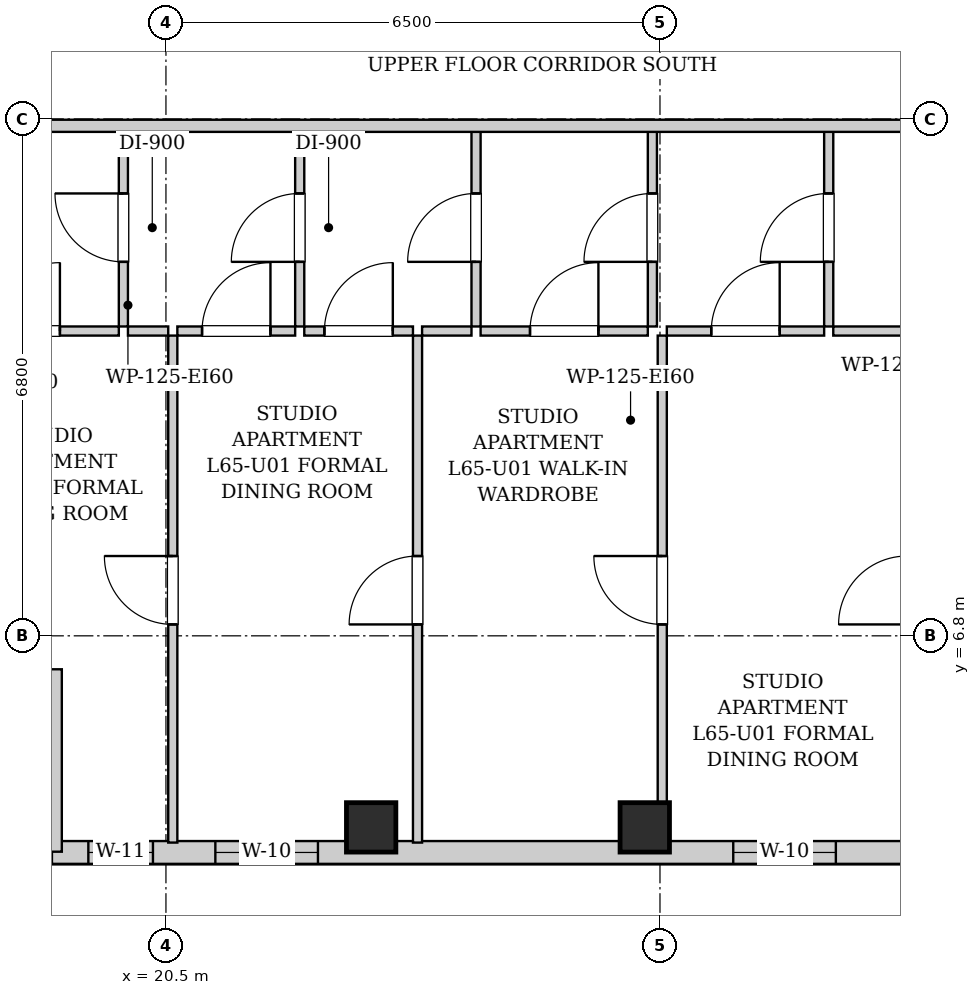
"""IFC4 building model, lengths in metres.
Left out: names, types, materials, properties, quantities, classifications, styles, units other than length and angle.
Written with IfcOpenShell. Run it as: python <this file> out.ifc"""

import sys

from ifc_helpers import new_model, si_unit, direction, frame, frame_2d, origin, origin_2d, place, context, subcontext, project, spatial, rectangle, extrude, element, fill, save


model = new_model("IFC4")
c1 = context("Model", 3, precision=1e-05, world=origin(), true_north=direction((0.0, 1.0)))
c2 = subcontext(c1, "Body", "Model", "MODEL_VIEW")
j1 = project(units=[si_unit("LENGTHUNIT", "METRE"), si_unit("PLANEANGLEUNIT", "RADIAN")], contexts=[c1])
p1 = place(None, origin())
s1 = spatial("IfcSite", under=j1, at=p1, CompositionType="ELEMENT")
p2 = place(p1, origin())
s2 = spatial("IfcBuilding", under=s1, at=p2, CompositionType="ELEMENT")
p3 = place(p2, frame((0.0, 0.0, 224.1)))
s3 = spatial("IfcBuildingStorey", under=s2, at=p3, CompositionType="ELEMENT", Elevation=224.1)
for number, where, z_axis, x_axis in (
    (1, (23.2, 4.28, 0.0), (0.0, 0.0, 1.0), (1.0, 0.0, 0.0)),
    (2, (26.8, 4.28, 0.0), (0.0, 0.0, 1.0), (1.0, 0.0, 0.0)),
):
    element("IfcColumn", number, at=place(p3, frame(where, z_axis=z_axis, x_axis=x_axis)), inside=s3, PredefinedType="COLUMN", context=c2, shape_type="SweptSolid", body=[
        extrude(rectangle(XDim=0.65, YDim=0.65, at=origin_2d()), origin(), (0.0, 0.0, 1.0), 3.4),
    ])
p4 = place(p3, frame((31.5, 3.95, 0.0), z_axis=(0.0, 0.0, 1.0), x_axis=(-1.0, 0.0, 0.0)))
e3 = element("IfcWall", 3, at=p4, inside=s3, PredefinedType="SOLIDWALL", context=c2, shape_type="SweptSolid", body=[
    extrude(rectangle(XDim=12.5, YDim=0.3, at=frame_2d((6.25, 0.0))), origin(), (0.0, 0.0, 1.0), 3.14),
])
p5 = place(p4, frame((11.171, 0.0, 0.55)))
e4 = element("IfcOpeningElement", 4, at=p5, cuts=e3, PredefinedType="OPENING", context=c2, shape_type="SweptSolid", body=[
    extrude(rectangle(XDim=0.85, YDim=1.2, at=frame_2d((0.425, 0.6))), frame((0.0, 0.16, 0.0), z_axis=(0.0, -1.0, 0.0), x_axis=(1.0, 0.0, 0.0)), (0.0, 0.0, 1.0), 0.32),
])
p6 = place(p4, frame((9.0, 0.0, 0.55)))
e5 = element("IfcOpeningElement", 5, at=p6, cuts=e3, PredefinedType="OPENING", context=c2, shape_type="SweptSolid", body=[
    extrude(rectangle(XDim=1.35, YDim=1.2, at=frame_2d((0.675, 0.6))), frame((0.0, 0.16, 0.0), z_axis=(0.0, -1.0, 0.0), x_axis=(1.0, 0.0, 0.0)), (0.0, 0.0, 1.0), 0.32),
])
p7 = place(p4, frame((2.186, 0.0, 0.55)))
e6 = element("IfcOpeningElement", 6, at=p7, cuts=e3, PredefinedType="OPENING", context=c2, shape_type="SweptSolid", body=[
    extrude(rectangle(XDim=1.35, YDim=1.2, at=frame_2d((0.675, 0.6))), frame((0.0, 0.16, 0.0), z_axis=(0.0, -1.0, 0.0), x_axis=(1.0, 0.0, 0.0)), (0.0, 0.0, 1.0), 0.32),
])
p8 = place(p4, frame((0.35, 0.0, 0.55)))
e7 = element("IfcOpeningElement", 7, at=p8, cuts=e3, PredefinedType="OPENING", context=c2, shape_type="SweptSolid", body=[
    extrude(rectangle(XDim=0.68, YDim=1.2, at=frame_2d((0.34, 0.6))), frame((0.0, 0.16, 0.0), z_axis=(0.0, -1.0, 0.0), x_axis=(1.0, 0.0, 0.0)), (0.0, 0.0, 1.0), 0.32),
])
p9 = place(p3, frame((19.0, 3.96, 0.0), z_axis=(0.0, 0.0, 1.0), x_axis=(0.0, 1.0, 0.0)))
e8 = element("IfcWall", 8, at=p9, inside=s3, PredefinedType="SOLIDWALL", context=c2, shape_type="SweptSolid", body=[
    extrude(rectangle(XDim=2.4, YDim=0.26, at=frame_2d((1.2, 0.0))), origin(), (0.0, 0.0, 1.0), 3.14),
])
p10 = place(p3, frame((19.94, 10.87, 0.0), z_axis=(0.0, 0.0, 1.0), x_axis=(0.0, 1.0, 0.0)))
e9 = element("IfcWall", 9, at=p10, inside=s3, PredefinedType="PARTITIONING", context=c2, shape_type="SweptSolid", body=[
    extrude(rectangle(XDim=2.6, YDim=0.12, at=frame_2d((1.3, 0.0))), origin(), (0.0, 0.0, 1.0), 3.14),
])
p11 = place(p10, frame((0.85, 0.0, 0.0)))
e10 = element("IfcOpeningElement", 10, at=p11, cuts=e9, PredefinedType="OPENING", context=c2, shape_type="SweptSolid", body=[
    extrude(rectangle(XDim=0.9, YDim=2.05, at=frame_2d((0.45, 1.025))), frame((0.0, 0.07, 0.0), z_axis=(0.0, -1.0, 0.0), x_axis=(1.0, 0.0, 0.0)), (0.0, 0.0, 1.0), 0.14),
])
p12 = place(p3, frame((17.43, 10.81, 0.0), z_axis=(0.0, 0.0, 1.0), x_axis=(1.0, 0.0, 0.0)))
e11 = element("IfcWall", 11, at=p12, inside=s3, PredefinedType="PARTITIONING", context=c2, shape_type="SweptSolid", body=[
    extrude(rectangle(XDim=2.45, YDim=0.12, at=frame_2d((1.225, 0.0))), origin(), (0.0, 0.0, 1.0), 3.14),
])
p13 = place(p12, frame((0.775, 0.0, 0.0)))
e12 = element("IfcOpeningElement", 12, at=p13, cuts=e11, PredefinedType="OPENING", context=c2, shape_type="SweptSolid", body=[
    extrude(rectangle(XDim=0.9, YDim=2.05, at=frame_2d((0.45, 1.025))), frame((0.0, 0.07, 0.0), z_axis=(0.0, -1.0, 0.0), x_axis=(1.0, 0.0, 0.0)), (0.0, 0.0, 1.0), 0.14),
])
p14 = place(p3, frame((22.26, 10.87, 0.0), z_axis=(0.0, 0.0, 1.0), x_axis=(0.0, 1.0, 0.0)))
e13 = element("IfcWall", 13, at=p14, inside=s3, PredefinedType="PARTITIONING", context=c2, shape_type="SweptSolid", body=[
    extrude(rectangle(XDim=2.6, YDim=0.12, at=frame_2d((1.3, 0.0))), origin(), (0.0, 0.0, 1.0), 3.14),
])
p15 = place(p14, frame((0.85, 0.0, 0.0)))
e14 = element("IfcOpeningElement", 14, at=p15, cuts=e13, PredefinedType="OPENING", context=c2, shape_type="SweptSolid", body=[
    extrude(rectangle(XDim=0.9, YDim=2.05, at=frame_2d((0.45, 1.025))), frame((0.0, 0.07, 0.0), z_axis=(0.0, -1.0, 0.0), x_axis=(1.0, 0.0, 0.0)), (0.0, 0.0, 1.0), 0.14),
])
p16 = place(p3, frame((20.0, 10.81, 0.0), z_axis=(0.0, 0.0, 1.0), x_axis=(1.0, 0.0, 0.0)))
e15 = element("IfcWall", 15, at=p16, inside=s3, PredefinedType="PARTITIONING", context=c2, shape_type="SweptSolid", body=[
    extrude(rectangle(XDim=0.53, YDim=0.12, at=frame_2d((0.265, 0.0))), origin(), (0.0, 0.0, 1.0), 3.14),
])
p17 = place(p3, frame((20.65, 10.81, 0.0), z_axis=(0.0, 0.0, 1.0), x_axis=(1.0, 0.0, 0.0)))
e16 = element("IfcWall", 16, at=p17, inside=s3, PredefinedType="PARTITIONING", context=c2, shape_type="SweptSolid", body=[
    extrude(rectangle(XDim=1.55, YDim=0.12, at=frame_2d((0.775, 0.0))), origin(), (0.0, 0.0, 1.0), 3.14),
])
p18 = place(p17, frame((0.325, 0.0, 0.0)))
e17 = element("IfcOpeningElement", 17, at=p18, cuts=e16, PredefinedType="OPENING", context=c2, shape_type="SweptSolid", body=[
    extrude(rectangle(XDim=0.9, YDim=2.05, at=frame_2d((0.45, 1.025))), frame((0.0, 0.07, 0.0), z_axis=(0.0, -1.0, 0.0), x_axis=(1.0, 0.0, 0.0)), (0.0, 0.0, 1.0), 0.14),
])
p19 = place(p3, frame((24.58, 10.87, 0.0), z_axis=(0.0, 0.0, 1.0), x_axis=(0.0, 1.0, 0.0)))
e18 = element("IfcWall", 18, at=p19, inside=s3, PredefinedType="PARTITIONING", context=c2, shape_type="SweptSolid", body=[
    extrude(rectangle(XDim=2.6, YDim=0.12, at=frame_2d((1.3, 0.0))), origin(), (0.0, 0.0, 1.0), 3.14),
])
p20 = place(p19, frame((0.85, 0.0, 0.0)))
e19 = element("IfcOpeningElement", 19, at=p20, cuts=e18, PredefinedType="OPENING", context=c2, shape_type="SweptSolid", body=[
    extrude(rectangle(XDim=0.9, YDim=2.05, at=frame_2d((0.45, 1.025))), frame((0.0, 0.07, 0.0), z_axis=(0.0, -1.0, 0.0), x_axis=(1.0, 0.0, 0.0)), (0.0, 0.0, 1.0), 0.14),
])
p21 = place(p3, frame((22.32, 10.81, 0.0), z_axis=(0.0, 0.0, 1.0), x_axis=(1.0, 0.0, 0.0)))
e20 = element("IfcWall", 20, at=p21, inside=s3, PredefinedType="PARTITIONING", context=c2, shape_type="SweptSolid", body=[
    extrude(rectangle(XDim=1.43, YDim=0.12, at=frame_2d((0.715, 0.0))), origin(), (0.0, 0.0, 1.0), 3.14),
])
p22 = place(p21, frame((0.265, 0.0, 0.0)))
e21 = element("IfcOpeningElement", 21, at=p22, cuts=e20, PredefinedType="OPENING", context=c2, shape_type="SweptSolid", body=[
    extrude(rectangle(XDim=0.9, YDim=2.05, at=frame_2d((0.45, 1.025))), frame((0.0, 0.07, 0.0), z_axis=(0.0, -1.0, 0.0), x_axis=(1.0, 0.0, 0.0)), (0.0, 0.0, 1.0), 0.14),
])
p23 = place(p3, frame((23.87, 10.81, 0.0), z_axis=(0.0, 0.0, 1.0), x_axis=(1.0, 0.0, 0.0)))
e22 = element("IfcWall", 22, at=p23, inside=s3, PredefinedType="PARTITIONING", context=c2, shape_type="SweptSolid", body=[
    extrude(rectangle(XDim=0.65, YDim=0.12, at=frame_2d((0.325, 0.0))), origin(), (0.0, 0.0, 1.0), 3.14),
])
p24 = place(p3, frame((26.9, 10.87, 0.0), z_axis=(0.0, 0.0, 1.0), x_axis=(0.0, 1.0, 0.0)))
e23 = element("IfcWall", 23, at=p24, inside=s3, PredefinedType="PARTITIONING", context=c2, shape_type="SweptSolid", body=[
    extrude(rectangle(XDim=2.6, YDim=0.12, at=frame_2d((1.3, 0.0))), origin(), (0.0, 0.0, 1.0), 3.14),
])
p25 = place(p24, frame((0.85, 0.0, 0.0)))
e24 = element("IfcOpeningElement", 24, at=p25, cuts=e23, PredefinedType="OPENING", context=c2, shape_type="SweptSolid", body=[
    extrude(rectangle(XDim=0.9, YDim=2.05, at=frame_2d((0.45, 1.025))), frame((0.0, 0.07, 0.0), z_axis=(0.0, -1.0, 0.0), x_axis=(1.0, 0.0, 0.0)), (0.0, 0.0, 1.0), 0.14),
])
p26 = place(p3, frame((24.64, 10.81, 0.0), z_axis=(0.0, 0.0, 1.0), x_axis=(1.0, 0.0, 0.0)))
e25 = element("IfcWall", 25, at=p26, inside=s3, PredefinedType="PARTITIONING", context=c2, shape_type="SweptSolid", body=[
    extrude(rectangle(XDim=2.2, YDim=0.12, at=frame_2d((1.1, 0.0))), origin(), (0.0, 0.0, 1.0), 3.14),
])
p27 = place(p26, frame((0.65, 0.0, 0.0)))
e26 = element("IfcOpeningElement", 26, at=p27, cuts=e25, PredefinedType="OPENING", context=c2, shape_type="SweptSolid", body=[
    extrude(rectangle(XDim=0.9, YDim=2.05, at=frame_2d((0.45, 1.025))), frame((0.0, 0.07, 0.0), z_axis=(0.0, -1.0, 0.0), x_axis=(1.0, 0.0, 0.0)), (0.0, 0.0, 1.0), 0.14),
])
p28 = place(p3, frame((29.22, 10.87, 0.0), z_axis=(0.0, 0.0, 1.0), x_axis=(0.0, 1.0, 0.0)))
e27 = element("IfcWall", 27, at=p28, inside=s3, PredefinedType="PARTITIONING", context=c2, shape_type="SweptSolid", body=[
    extrude(rectangle(XDim=2.6, YDim=0.12, at=frame_2d((1.3, 0.0))), origin(), (0.0, 0.0, 1.0), 3.14),
])
p29 = place(p28, frame((0.85, 0.0, 0.0)))
e28 = element("IfcOpeningElement", 28, at=p29, cuts=e27, PredefinedType="OPENING", context=c2, shape_type="SweptSolid", body=[
    extrude(rectangle(XDim=0.9, YDim=2.05, at=frame_2d((0.45, 1.025))), frame((0.0, 0.07, 0.0), z_axis=(0.0, -1.0, 0.0), x_axis=(1.0, 0.0, 0.0)), (0.0, 0.0, 1.0), 0.14),
])
p30 = place(p3, frame((27.09, 10.81, 0.0), z_axis=(0.0, 0.0, 1.0), x_axis=(1.0, 0.0, 0.0)))
e29 = element("IfcWall", 29, at=p30, inside=s3, PredefinedType="PARTITIONING", context=c2, shape_type="SweptSolid", body=[
    extrude(rectangle(XDim=2.07, YDim=0.12, at=frame_2d((1.035, 0.0))), origin(), (0.0, 0.0, 1.0), 3.14),
])
p31 = place(p30, frame((0.585, 0.0, 0.0)))
e30 = element("IfcOpeningElement", 30, at=p31, cuts=e29, PredefinedType="OPENING", context=c2, shape_type="SweptSolid", body=[
    extrude(rectangle(XDim=0.9, YDim=2.05, at=frame_2d((0.45, 1.025))), frame((0.0, 0.07, 0.0), z_axis=(0.0, -1.0, 0.0), x_axis=(1.0, 0.0, 0.0)), (0.0, 0.0, 1.0), 0.14),
])
p32 = place(p3, frame((29.28, 10.81, 0.0), z_axis=(0.0, 0.0, 1.0), x_axis=(1.0, 0.0, 0.0)))
e31 = element("IfcWall", 31, at=p32, inside=s3, PredefinedType="PARTITIONING", context=c2, shape_type="SweptSolid", body=[
    extrude(rectangle(XDim=0.91, YDim=0.12, at=frame_2d((0.455, 0.0))), origin(), (0.0, 0.0, 1.0), 3.14),
])
p33 = place(p3, frame((20.59, 4.08, 0.0), z_axis=(0.0, 0.0, 1.0), x_axis=(0.0, 1.0, 0.0)))
e32 = element("IfcWall", 32, at=p33, inside=s3, PredefinedType="PARTITIONING", context=c2, shape_type="SweptSolid", body=[
    extrude(rectangle(XDim=6.67, YDim=0.12, at=frame_2d((3.335, 0.0))), origin(), (0.0, 0.0, 1.0), 3.14),
])
p34 = place(p33, frame((2.87, 0.0, 0.0)))
e33 = element("IfcOpeningElement", 33, at=p34, cuts=e32, PredefinedType="OPENING", context=c2, shape_type="SweptSolid", body=[
    extrude(rectangle(XDim=0.9, YDim=2.05, at=frame_2d((0.45, 1.025))), frame((0.0, 0.07, 0.0), z_axis=(0.0, -1.0, 0.0), x_axis=(1.0, 0.0, 0.0)), (0.0, 0.0, 1.0), 0.14),
])
p35 = place(p3, frame((23.81, 4.08, 0.0), z_axis=(0.0, 0.0, 1.0), x_axis=(0.0, 1.0, 0.0)))
e34 = element("IfcWall", 34, at=p35, inside=s3, PredefinedType="PARTITIONING", context=c2, shape_type="SweptSolid", body=[
    extrude(rectangle(XDim=6.67, YDim=0.12, at=frame_2d((3.335, 0.0))), origin(), (0.0, 0.0, 1.0), 3.14),
])
p36 = place(p35, frame((2.87, 0.0, 0.0)))
e35 = element("IfcOpeningElement", 35, at=p36, cuts=e34, PredefinedType="OPENING", context=c2, shape_type="SweptSolid", body=[
    extrude(rectangle(XDim=0.9, YDim=2.05, at=frame_2d((0.45, 1.025))), frame((0.0, 0.07, 0.0), z_axis=(0.0, -1.0, 0.0), x_axis=(1.0, 0.0, 0.0)), (0.0, 0.0, 1.0), 0.14),
])
p37 = place(p3, frame((27.03, 4.08, 0.0), z_axis=(0.0, 0.0, 1.0), x_axis=(0.0, 1.0, 0.0)))
e36 = element("IfcWall", 36, at=p37, inside=s3, PredefinedType="PARTITIONING", context=c2, shape_type="SweptSolid", body=[
    extrude(rectangle(XDim=6.67, YDim=0.12, at=frame_2d((3.335, 0.0))), origin(), (0.0, 0.0, 1.0), 3.14),
])
p38 = place(p37, frame((2.87, 0.0, 0.0)))
e37 = element("IfcOpeningElement", 37, at=p38, cuts=e36, PredefinedType="OPENING", context=c2, shape_type="SweptSolid", body=[
    extrude(rectangle(XDim=0.9, YDim=2.05, at=frame_2d((0.45, 1.025))), frame((0.0, 0.07, 0.0), z_axis=(0.0, -1.0, 0.0), x_axis=(1.0, 0.0, 0.0)), (0.0, 0.0, 1.0), 0.14),
])
p39 = place(p3, frame((13.15, 13.51, 0.0), z_axis=(0.0, 0.0, 1.0), x_axis=(1.0, 0.0, 0.0)))
e38 = element("IfcWall", 38, at=p39, inside=s3, PredefinedType="PARTITIONING", context=c2, shape_type="SweptSolid", body=[
    extrude(rectangle(XDim=24.6, YDim=0.16, at=frame_2d((12.3, 0.0))), origin(), (0.0, 0.0, 1.0), 3.14),
])
p40 = place(p39, frame((3.165, 0.0, 0.0)))
e39 = element("IfcOpeningElement", 39, at=p40, cuts=e38, PredefinedType="OPENING", context=c2, shape_type="SweptSolid", body=[
    extrude(rectangle(XDim=0.95, YDim=2.1, at=frame_2d((0.475, 1.05))), frame((0.0, 0.09, 0.0), z_axis=(0.0, -1.0, 0.0), x_axis=(1.0, 0.0, 0.0)), (0.0, 0.0, 1.0), 0.18),
])
p41 = place(p11, origin())
e40 = element("IfcDoor", 40, at=p41, inside=s3, OperationType="SINGLE_SWING_RIGHT", PredefinedType="DOOR", context=c2, shape_type="SweptSolid", body=[
    extrude(rectangle(XDim=0.9, YDim=2.05, at=frame_2d((0.45, 1.025))), frame((0.0, 0.025, 0.0), z_axis=(0.0, -1.0, 0.0), x_axis=(1.0, 0.0, 0.0)), (0.0, 0.0, 1.0), 0.05),
])
fill(e10, e40)
p42 = place(p13, origin())
e41 = element("IfcDoor", 41, at=p42, inside=s3, OperationType="SINGLE_SWING_RIGHT", PredefinedType="DOOR", context=c2, shape_type="SweptSolid", body=[
    extrude(rectangle(XDim=0.9, YDim=2.05, at=frame_2d((0.45, 1.025))), frame((0.0, 0.025, 0.0), z_axis=(0.0, -1.0, 0.0), x_axis=(1.0, 0.0, 0.0)), (0.0, 0.0, 1.0), 0.05),
])
fill(e12, e41)
p43 = place(p15, origin())
e42 = element("IfcDoor", 42, at=p43, inside=s3, OperationType="SINGLE_SWING_LEFT", PredefinedType="DOOR", context=c2, shape_type="SweptSolid", body=[
    extrude(rectangle(XDim=0.9, YDim=2.05, at=frame_2d((0.45, 1.025))), frame((0.0, 0.025, 0.0), z_axis=(0.0, -1.0, 0.0), x_axis=(1.0, 0.0, 0.0)), (0.0, 0.0, 1.0), 0.05),
])
fill(e14, e42)
p44 = place(p18, origin())
e43 = element("IfcDoor", 43, at=p44, inside=s3, OperationType="SINGLE_SWING_RIGHT", PredefinedType="DOOR", context=c2, shape_type="SweptSolid", body=[
    extrude(rectangle(XDim=0.9, YDim=2.05, at=frame_2d((0.45, 1.025))), frame((0.0, 0.025, 0.0), z_axis=(0.0, -1.0, 0.0), x_axis=(1.0, 0.0, 0.0)), (0.0, 0.0, 1.0), 0.05),
])
fill(e17, e43)
p45 = place(p20, origin())
e44 = element("IfcDoor", 44, at=p45, inside=s3, OperationType="SINGLE_SWING_LEFT", PredefinedType="DOOR", context=c2, shape_type="SweptSolid", body=[
    extrude(rectangle(XDim=0.9, YDim=2.05, at=frame_2d((0.45, 1.025))), frame((0.0, 0.025, 0.0), z_axis=(0.0, -1.0, 0.0), x_axis=(1.0, 0.0, 0.0)), (0.0, 0.0, 1.0), 0.05),
])
fill(e19, e44)
p46 = place(p22, origin())
e45 = element("IfcDoor", 45, at=p46, inside=s3, OperationType="SINGLE_SWING_RIGHT", PredefinedType="DOOR", context=c2, shape_type="SweptSolid", body=[
    extrude(rectangle(XDim=0.9, YDim=2.05, at=frame_2d((0.45, 1.025))), frame((0.0, 0.025, 0.0), z_axis=(0.0, -1.0, 0.0), x_axis=(1.0, 0.0, 0.0)), (0.0, 0.0, 1.0), 0.05),
])
fill(e21, e45)
p47 = place(p25, origin())
e46 = element("IfcDoor", 46, at=p47, inside=s3, OperationType="SINGLE_SWING_LEFT", PredefinedType="DOOR", context=c2, shape_type="SweptSolid", body=[
    extrude(rectangle(XDim=0.9, YDim=2.05, at=frame_2d((0.45, 1.025))), frame((0.0, 0.025, 0.0), z_axis=(0.0, -1.0, 0.0), x_axis=(1.0, 0.0, 0.0)), (0.0, 0.0, 1.0), 0.05),
])
fill(e24, e46)
p48 = place(p27, origin())
e47 = element("IfcDoor", 47, at=p48, inside=s3, OperationType="SINGLE_SWING_RIGHT", PredefinedType="DOOR", context=c2, shape_type="SweptSolid", body=[
    extrude(rectangle(XDim=0.9, YDim=2.05, at=frame_2d((0.45, 1.025))), frame((0.0, 0.025, 0.0), z_axis=(0.0, -1.0, 0.0), x_axis=(1.0, 0.0, 0.0)), (0.0, 0.0, 1.0), 0.05),
])
fill(e26, e47)
p49 = place(p29, origin())
e48 = element("IfcDoor", 48, at=p49, inside=s3, OperationType="SINGLE_SWING_LEFT", PredefinedType="DOOR", context=c2, shape_type="SweptSolid", body=[
    extrude(rectangle(XDim=0.9, YDim=2.05, at=frame_2d((0.45, 1.025))), frame((0.0, 0.025, 0.0), z_axis=(0.0, -1.0, 0.0), x_axis=(1.0, 0.0, 0.0)), (0.0, 0.0, 1.0), 0.05),
])
fill(e28, e48)
p50 = place(p31, origin())
e49 = element("IfcDoor", 49, at=p50, inside=s3, OperationType="SINGLE_SWING_RIGHT", PredefinedType="DOOR", context=c2, shape_type="SweptSolid", body=[
    extrude(rectangle(XDim=0.9, YDim=2.05, at=frame_2d((0.45, 1.025))), frame((0.0, 0.025, 0.0), z_axis=(0.0, -1.0, 0.0), x_axis=(1.0, 0.0, 0.0)), (0.0, 0.0, 1.0), 0.05),
])
fill(e30, e49)
p51 = place(p34, origin())
e50 = element("IfcDoor", 50, at=p51, inside=s3, OperationType="SINGLE_SWING_RIGHT", PredefinedType="DOOR", context=c2, shape_type="SweptSolid", body=[
    extrude(rectangle(XDim=0.9, YDim=2.05, at=frame_2d((0.45, 1.025))), frame((0.0, 0.025, 0.0), z_axis=(0.0, -1.0, 0.0), x_axis=(1.0, 0.0, 0.0)), (0.0, 0.0, 1.0), 0.05),
])
fill(e33, e50)
p52 = place(p36, origin())
e51 = element("IfcDoor", 51, at=p52, inside=s3, OperationType="SINGLE_SWING_LEFT", PredefinedType="DOOR", context=c2, shape_type="SweptSolid", body=[
    extrude(rectangle(XDim=0.9, YDim=2.05, at=frame_2d((0.45, 1.025))), frame((0.0, 0.025, 0.0), z_axis=(0.0, -1.0, 0.0), x_axis=(1.0, 0.0, 0.0)), (0.0, 0.0, 1.0), 0.05),
])
fill(e35, e51)
p53 = place(p38, origin())
e52 = element("IfcDoor", 52, at=p53, inside=s3, OperationType="SINGLE_SWING_RIGHT", PredefinedType="DOOR", context=c2, shape_type="SweptSolid", body=[
    extrude(rectangle(XDim=0.9, YDim=2.05, at=frame_2d((0.45, 1.025))), frame((0.0, 0.025, 0.0), z_axis=(0.0, -1.0, 0.0), x_axis=(1.0, 0.0, 0.0)), (0.0, 0.0, 1.0), 0.05),
])
fill(e37, e52)
p54 = place(p5, origin())
e53 = element("IfcWindow", 53, at=p54, inside=s3, PartitioningType="SINGLE_PANEL", PredefinedType="WINDOW", context=c2, shape_type="SweptSolid", body=[
    extrude(rectangle(XDim=0.85, YDim=1.2, at=frame_2d((0.425, 0.6))), frame((0.0, 0.03, 0.0), z_axis=(0.0, -1.0, 0.0), x_axis=(1.0, 0.0, 0.0)), (0.0, 0.0, 1.0), 0.06),
])
fill(e4, e53)
p55 = place(p6, origin())
e54 = element("IfcWindow", 54, at=p55, inside=s3, PartitioningType="SINGLE_PANEL", PredefinedType="WINDOW", context=c2, shape_type="SweptSolid", body=[
    extrude(rectangle(XDim=1.35, YDim=1.2, at=frame_2d((0.675, 0.6))), frame((0.0, 0.03, 0.0), z_axis=(0.0, -1.0, 0.0), x_axis=(1.0, 0.0, 0.0)), (0.0, 0.0, 1.0), 0.06),
])
fill(e5, e54)
p56 = place(p7, origin())
e55 = element("IfcWindow", 55, at=p56, inside=s3, PartitioningType="SINGLE_PANEL", PredefinedType="WINDOW", context=c2, shape_type="SweptSolid", body=[
    extrude(rectangle(XDim=1.35, YDim=1.2, at=frame_2d((0.675, 0.6))), frame((0.0, 0.03, 0.0), z_axis=(0.0, -1.0, 0.0), x_axis=(1.0, 0.0, 0.0)), (0.0, 0.0, 1.0), 0.06),
])
fill(e6, e55)
save(model, sys.argv[1])
